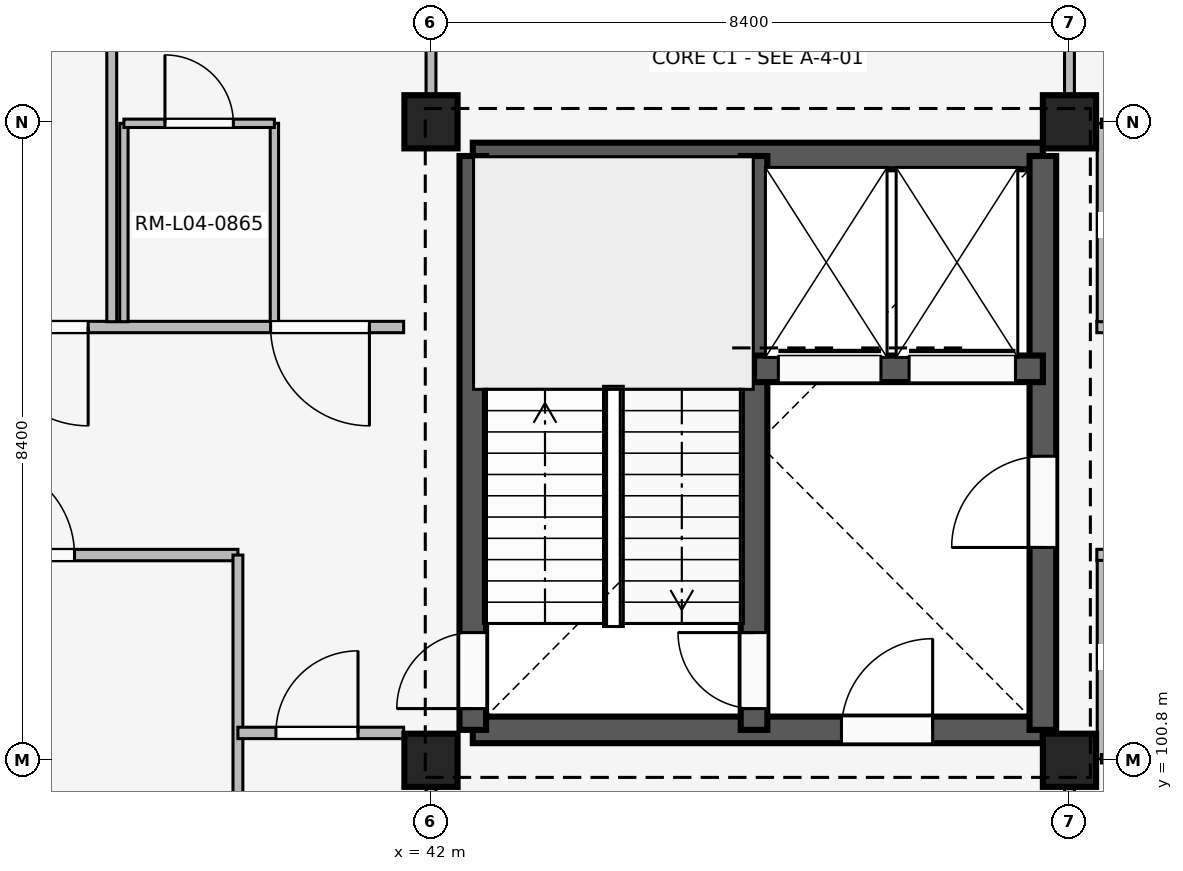
"""IFC4 building model, lengths in metres.
Left out: names, types, materials, properties, quantities, classifications, styles, units other than length and angle.
Written with IfcOpenShell. Run it as: python <this file> out.ifc"""

import sys

from ifc_helpers import new_model, si_unit, direction, frame, frame_2d, origin, origin_2d, place, context, subcontext, project, spatial, rectangle, extrude, element, fill, save


model = new_model("IFC4")
c1 = context("Model", 3, precision=1e-05, world=origin(), true_north=direction((0.0, 1.0)))
c2 = subcontext(c1, "Body", "Model", "MODEL_VIEW")
j1 = project(units=[si_unit("LENGTHUNIT", "METRE"), si_unit("PLANEANGLEUNIT", "RADIAN")], contexts=[c1])
p1 = place(None, origin())
s1 = spatial("IfcSite", under=j1, at=p1, CompositionType="ELEMENT")
p2 = place(p1, origin())
s2 = spatial("IfcBuilding", under=s1, at=p2, CompositionType="ELEMENT")
p3 = place(p2, frame((0.0, 0.0, 16.2)))
s3 = spatial("IfcBuildingStorey", under=s2, at=p3, CompositionType="ELEMENT", Elevation=16.2)
for number, where, z_axis, x_axis in (
    (1, (42.0, 100.8, 0.0), (0.0, 0.0, 1.0), (1.0, 0.0, 0.0)),
    (2, (42.0, 109.2, 0.0), (0.0, 0.0, 1.0), (1.0, 0.0, 0.0)),
    (3, (50.4, 100.8, 0.0), (0.0, 0.0, 1.0), (1.0, 0.0, 0.0)),
    (4, (50.4, 109.2, 0.0), (0.0, 0.0, 1.0), (1.0, 0.0, 0.0)),
):
    element("IfcColumn", number, at=place(p3, frame(where, z_axis=z_axis, x_axis=x_axis)), inside=s3, PredefinedType="COLUMN", context=c2, shape_type="SweptSolid", body=[
        extrude(rectangle(XDim=0.7, YDim=0.7, at=origin_2d()), origin(), (0.0, 0.0, 1.0), 4.2),
    ])
p4 = place(p3, frame((42.55, 101.2, 0.0), z_axis=(0.0, 0.0, 1.0), x_axis=(1.0, 0.0, 0.0)))
e5 = element("IfcWall", 5, at=p4, inside=s3, PredefinedType="SHEAR", context=c2, shape_type="SweptSolid", body=[
    extrude(rectangle(XDim=7.5, YDim=0.35, at=frame_2d((3.75, 0.0))), origin(), (0.0, 0.0, 1.0), 3.92),
])
p5 = place(p4, frame((4.85, 0.0, 0.0)))
e6 = element("IfcOpeningElement", 6, at=p5, cuts=e5, PredefinedType="OPENING", context=c2, shape_type="SweptSolid", body=[
    extrude(rectangle(XDim=1.2, YDim=2.2, at=frame_2d((0.6, 1.1))), frame((0.0, 0.185, 0.0), z_axis=(0.0, -1.0, 0.0), x_axis=(1.0, 0.0, 0.0)), (0.0, 0.0, 1.0), 0.37),
])
p6 = place(p3, frame((42.55, 108.75, 0.0), z_axis=(0.0, 0.0, 1.0), x_axis=(1.0, 0.0, 0.0)))
e7 = element("IfcWall", 7, at=p6, inside=s3, PredefinedType="SHEAR", context=c2, shape_type="SweptSolid", body=[
    extrude(rectangle(XDim=7.5, YDim=0.35, at=frame_2d((3.75, 0.0))), origin(), (0.0, 0.0, 1.0), 3.92),
])
p7 = place(p3, frame((42.55, 101.2, 0.0), z_axis=(0.0, 0.0, 1.0), x_axis=(0.0, 1.0, 0.0)))
e8 = element("IfcWall", 8, at=p7, inside=s3, PredefinedType="SHEAR", context=c2, shape_type="SweptSolid", body=[
    extrude(rectangle(XDim=7.55, YDim=0.35, at=frame_2d((3.775, 0.0))), origin(), (0.0, 0.0, 1.0), 3.92),
])
p8 = place(p7, frame((0.28, 0.0, 0.0)))
e9 = element("IfcOpeningElement", 9, at=p8, cuts=e8, PredefinedType="OPENING", context=c2, shape_type="SweptSolid", body=[
    extrude(rectangle(XDim=1.0, YDim=2.15, at=frame_2d((0.5, 1.075))), frame((0.0, 0.185, 0.0), z_axis=(0.0, -1.0, 0.0), x_axis=(1.0, 0.0, 0.0)), (0.0, 0.0, 1.0), 0.37),
])
p9 = place(p3, frame((50.05, 101.2, 0.0), z_axis=(0.0, 0.0, 1.0), x_axis=(0.0, 1.0, 0.0)))
e10 = element("IfcWall", 10, at=p9, inside=s3, PredefinedType="SHEAR", context=c2, shape_type="SweptSolid", body=[
    extrude(rectangle(XDim=7.55, YDim=0.35, at=frame_2d((3.775, 0.0))), origin(), (0.0, 0.0, 1.0), 3.92),
])
p10 = place(p9, frame((2.4, 0.0, 0.0)))
e11 = element("IfcOpeningElement", 11, at=p10, cuts=e10, PredefinedType="OPENING", context=c2, shape_type="SweptSolid", body=[
    extrude(rectangle(XDim=1.2, YDim=2.2, at=frame_2d((0.6, 1.1))), frame((0.0, 0.185, 0.0), z_axis=(0.0, -1.0, 0.0), x_axis=(1.0, 0.0, 0.0)), (0.0, 0.0, 1.0), 0.37),
])
p11 = place(p3, frame((46.25, 101.2, 0.0), z_axis=(0.0, 0.0, 1.0), x_axis=(0.0, 1.0, 0.0)))
e12 = element("IfcWall", 12, at=p11, inside=s3, PredefinedType="SHEAR", context=c2, shape_type="SweptSolid", body=[
    extrude(rectangle(XDim=7.55, YDim=0.35, at=frame_2d((3.775, 0.0))), origin(), (0.0, 0.0, 1.0), 3.92),
])
p12 = place(p11, frame((0.28, 0.0, 0.0)))
e13 = element("IfcOpeningElement", 13, at=p12, cuts=e12, PredefinedType="OPENING", context=c2, shape_type="SweptSolid", body=[
    extrude(rectangle(XDim=1.0, YDim=2.15, at=frame_2d((0.5, 1.075))), frame((0.0, 0.185, 0.0), z_axis=(0.0, -1.0, 0.0), x_axis=(1.0, 0.0, 0.0)), (0.0, 0.0, 1.0), 0.37),
])
p13 = place(p3, frame((46.25, 105.95, 0.0), z_axis=(0.0, 0.0, 1.0), x_axis=(1.0, 0.0, 0.0)))
e14 = element("IfcWall", 14, at=p13, inside=s3, PredefinedType="SHEAR", context=c2, shape_type="SweptSolid", body=[
    extrude(rectangle(XDim=3.8, YDim=0.35, at=frame_2d((1.9, 0.0))), origin(), (0.0, 0.0, 1.0), 3.92),
])
p14 = place(p13, frame((0.32, 0.0, 0.0)))
e15 = element("IfcOpeningElement", 15, at=p14, cuts=e14, PredefinedType="OPENING", context=c2, shape_type="SweptSolid", body=[
    extrude(rectangle(XDim=1.35, YDim=2.25, at=frame_2d((0.675, 1.125))), frame((0.0, 0.185, 0.0), z_axis=(0.0, -1.0, 0.0), x_axis=(1.0, 0.0, 0.0)), (0.0, 0.0, 1.0), 0.37),
])
p15 = place(p13, frame((2.04, 0.0, 0.0)))
e16 = element("IfcOpeningElement", 16, at=p15, cuts=e14, PredefinedType="OPENING", context=c2, shape_type="SweptSolid", body=[
    extrude(rectangle(XDim=1.4, YDim=2.25, at=frame_2d((0.7, 1.125))), frame((0.0, 0.185, 0.0), z_axis=(0.0, -1.0, 0.0), x_axis=(1.0, 0.0, 0.0)), (0.0, 0.0, 1.0), 0.37),
])
p16 = place(p3, frame((33.68, 103.5, 0.0), z_axis=(0.0, 0.0, 1.0), x_axis=(1.0, 0.0, 0.0)))
e17 = element("IfcWall", 17, at=p16, inside=s3, PredefinedType="PARTITIONING", context=c2, shape_type="SweptSolid", body=[
    extrude(rectangle(XDim=5.78, YDim=0.15, at=frame_2d((2.89, 0.0))), origin(), (0.0, 0.0, 1.0), 3.3),
])
p17 = place(p16, frame((2.38, 0.0, 0.0)))
e18 = element("IfcOpeningElement", 18, at=p17, cuts=e17, PredefinedType="OPENING", context=c2, shape_type="SweptSolid", body=[
    extrude(rectangle(XDim=1.25, YDim=2.2, at=frame_2d((0.625, 1.1))), frame((0.0, 0.085, 0.0), z_axis=(0.0, -1.0, 0.0), x_axis=(1.0, 0.0, 0.0)), (0.0, 0.0, 1.0), 0.17),
])
p18 = place(p3, frame((39.46, 92.56, 0.0), z_axis=(0.0, 0.0, 1.0), x_axis=(0.0, 1.0, 0.0)))
e19 = element("IfcWall", 19, at=p18, inside=s3, PredefinedType="PARTITIONING", context=c2, shape_type="SweptSolid", body=[
    extrude(rectangle(XDim=10.94, YDim=0.13, at=frame_2d((5.47, 0.0))), origin(), (0.0, 0.0, 1.0), 3.3),
])
p19 = place(p3, frame((39.46, 101.16, 0.0), z_axis=(0.0, 0.0, 1.0), x_axis=(1.0, 0.0, 0.0)))
e20 = element("IfcWall", 20, at=p19, inside=s3, PredefinedType="PARTITIONING", context=c2, shape_type="SweptSolid", body=[
    extrude(rectangle(XDim=2.18, YDim=0.15, at=frame_2d((1.09, 0.0))), origin(), (0.0, 0.0, 1.0), 3.3),
])
p20 = place(p19, frame((0.5, 0.0, 0.0)))
e21 = element("IfcOpeningElement", 21, at=p20, cuts=e20, PredefinedType="OPENING", context=c2, shape_type="SweptSolid", body=[
    extrude(rectangle(XDim=1.08, YDim=2.15, at=frame_2d((0.54, 1.075))), frame((0.0, 0.085, 0.0), z_axis=(0.0, -1.0, 0.0), x_axis=(1.0, 0.0, 0.0)), (0.0, 0.0, 1.0), 0.17),
])
p21 = place(p3, frame((41.64, 106.5, 0.0), z_axis=(0.0, 0.0, 1.0), x_axis=(-1.0, 0.0, 0.0)))
e22 = element("IfcWall", 22, at=p21, inside=s3, PredefinedType="PARTITIONING", context=c2, shape_type="SweptSolid", body=[
    extrude(rectangle(XDim=7.96, YDim=0.15, at=frame_2d((3.98, 0.0))), origin(), (0.0, 0.0, 1.0), 3.3),
])
p22 = place(p21, frame((0.45, 0.0, 0.0)))
e23 = element("IfcOpeningElement", 23, at=p22, cuts=e22, PredefinedType="OPENING", context=c2, shape_type="SweptSolid", body=[
    extrude(rectangle(XDim=1.3, YDim=2.25, at=frame_2d((0.65, 1.125))), frame((0.0, 0.085, 0.0), z_axis=(0.0, -1.0, 0.0), x_axis=(1.0, 0.0, 0.0)), (0.0, 0.0, 1.0), 0.17),
])
p23 = place(p21, frame((4.15, 0.0, 0.0)))
e24 = element("IfcOpeningElement", 24, at=p23, cuts=e22, PredefinedType="OPENING", context=c2, shape_type="SweptSolid", body=[
    extrude(rectangle(XDim=1.3, YDim=2.25, at=frame_2d((0.65, 1.125))), frame((0.0, 0.085, 0.0), z_axis=(0.0, -1.0, 0.0), x_axis=(1.0, 0.0, 0.0)), (0.0, 0.0, 1.0), 0.17),
])
p24 = place(p3, frame((37.8, 106.57, 0.0), z_axis=(0.0, 0.0, 1.0), x_axis=(0.0, 1.0, 0.0)))
e25 = element("IfcWall", 25, at=p24, inside=s3, PredefinedType="PARTITIONING", context=c2, shape_type="SweptSolid", body=[
    extrude(rectangle(XDim=10.93, YDim=0.13, at=frame_2d((5.465, 0.0))), origin(), (0.0, 0.0, 1.0), 3.3),
])
for number, where, z_axis, x_axis in (
    (26, (37.96, 106.57, 0.0), (0.0, 0.0, 1.0), (0.0, 1.0, 0.0)),
    (27, (39.94, 106.57, 0.0), (0.0, 0.0, 1.0), (0.0, 1.0, 0.0)),
):
    element("IfcWall", number, at=place(p3, frame(where, z_axis=z_axis, x_axis=x_axis)), inside=s3, PredefinedType="PARTITIONING", context=c2, shape_type="SweptSolid", body=[
        extrude(rectangle(XDim=2.61, YDim=0.11, at=frame_2d((1.305, 0.0))), origin(), (0.0, 0.0, 1.0), 3.3),
    ])
p25 = place(p3, frame((37.96, 109.18, 0.0), z_axis=(0.0, 0.0, 1.0), x_axis=(1.0, 0.0, 0.0)))
e28 = element("IfcWall", 28, at=p25, inside=s3, PredefinedType="PARTITIONING", context=c2, shape_type="SweptSolid", body=[
    extrude(rectangle(XDim=1.98, YDim=0.11, at=frame_2d((0.99, 0.0))), origin(), (0.0, 0.0, 1.0), 3.3),
])
p26 = place(p25, frame((0.54, 0.0, 0.0)))
e29 = element("IfcOpeningElement", 29, at=p26, cuts=e28, PredefinedType="OPENING", context=c2, shape_type="SweptSolid", body=[
    extrude(rectangle(XDim=0.9, YDim=2.1, at=frame_2d((0.45, 1.05))), frame((0.0, 0.065, 0.0), z_axis=(0.0, -1.0, 0.0), x_axis=(1.0, 0.0, 0.0)), (0.0, 0.0, 1.0), 0.13),
])
p27 = place(p3, frame((42.0, 92.54, 0.0), z_axis=(0.0, 0.0, 1.0), x_axis=(0.0, 1.0, 0.0)))
e30 = element("IfcWall", 30, at=p27, inside=s3, PredefinedType="PARTITIONING", context=c2, shape_type="SweptSolid", body=[
    extrude(rectangle(XDim=8.21, YDim=0.13, at=frame_2d((4.105, 0.0))), origin(), (0.0, 0.0, 1.0), 3.3),
])
p28 = place(p27, frame((3.64, 0.0, 0.0)))
e31 = element("IfcOpeningElement", 31, at=p28, cuts=e30, PredefinedType="OPENING", context=c2, shape_type="SweptSolid", body=[
    extrude(rectangle(XDim=1.08, YDim=2.15, at=frame_2d((0.54, 1.075))), frame((0.0, 0.075, 0.0), z_axis=(0.0, -1.0, 0.0), x_axis=(1.0, 0.0, 0.0)), (0.0, 0.0, 1.0), 0.15),
])
p29 = place(p3, frame((42.0, 109.55, 0.0), z_axis=(0.0, 0.0, 1.0), x_axis=(0.0, 1.0, 0.0)))
e32 = element("IfcWall", 32, at=p29, inside=s3, PredefinedType="PARTITIONING", context=c2, shape_type="SweptSolid", body=[
    extrude(rectangle(XDim=7.91, YDim=0.13, at=frame_2d((3.955, 0.0))), origin(), (0.0, 0.0, 1.0), 3.3),
])
p30 = place(p29, frame((3.4, 0.0, 0.0)))
e33 = element("IfcOpeningElement", 33, at=p30, cuts=e32, PredefinedType="OPENING", context=c2, shape_type="SweptSolid", body=[
    extrude(rectangle(XDim=1.05, YDim=2.2, at=frame_2d((0.525, 1.1))), frame((0.0, 0.075, 0.0), z_axis=(0.0, -1.0, 0.0), x_axis=(1.0, 0.0, 0.0)), (0.0, 0.0, 1.0), 0.15),
])
p31 = place(p3, frame((50.4, 92.54, 0.0), z_axis=(0.0, 0.0, 1.0), x_axis=(0.0, 1.0, 0.0)))
e34 = element("IfcWall", 34, at=p31, inside=s3, PredefinedType="PARTITIONING", context=c2, shape_type="SweptSolid", body=[
    extrude(rectangle(XDim=8.21, YDim=0.13, at=frame_2d((4.105, 0.0))), origin(), (0.0, 0.0, 1.0), 3.3),
])
p32 = place(p31, frame((3.64, 0.0, 0.0)))
e35 = element("IfcOpeningElement", 35, at=p32, cuts=e34, PredefinedType="OPENING", context=c2, shape_type="SweptSolid", body=[
    extrude(rectangle(XDim=1.08, YDim=2.15, at=frame_2d((0.54, 1.075))), frame((0.0, 0.075, 0.0), z_axis=(0.0, -1.0, 0.0), x_axis=(1.0, 0.0, 0.0)), (0.0, 0.0, 1.0), 0.15),
])
p33 = place(p3, frame((50.4, 109.55, 0.0), z_axis=(0.0, 0.0, 1.0), x_axis=(0.0, 1.0, 0.0)))
e36 = element("IfcWall", 36, at=p33, inside=s3, PredefinedType="PARTITIONING", context=c2, shape_type="SweptSolid", body=[
    extrude(rectangle(XDim=7.91, YDim=0.13, at=frame_2d((3.955, 0.0))), origin(), (0.0, 0.0, 1.0), 3.3),
])
p34 = place(p33, frame((3.4, 0.0, 0.0)))
e37 = element("IfcOpeningElement", 37, at=p34, cuts=e36, PredefinedType="OPENING", context=c2, shape_type="SweptSolid", body=[
    extrude(rectangle(XDim=1.05, YDim=2.2, at=frame_2d((0.525, 1.1))), frame((0.0, 0.075, 0.0), z_axis=(0.0, -1.0, 0.0), x_axis=(1.0, 0.0, 0.0)), (0.0, 0.0, 1.0), 0.15),
])
p35 = place(p3, frame((50.76, 103.5, 0.0), z_axis=(0.0, 0.0, 1.0), x_axis=(1.0, 0.0, 0.0)))
e38 = element("IfcWall", 38, at=p35, inside=s3, PredefinedType="PARTITIONING", context=c2, shape_type="SweptSolid", body=[
    extrude(rectangle(XDim=7.96, YDim=0.15, at=frame_2d((3.98, 0.0))), origin(), (0.0, 0.0, 1.0), 3.3),
])
p36 = place(p35, frame((2.25, 0.0, 0.0)))
e39 = element("IfcOpeningElement", 39, at=p36, cuts=e38, PredefinedType="OPENING", context=c2, shape_type="SweptSolid", body=[
    extrude(rectangle(XDim=1.3, YDim=2.25, at=frame_2d((0.65, 1.125))), frame((0.0, 0.085, 0.0), z_axis=(0.0, -1.0, 0.0), x_axis=(1.0, 0.0, 0.0)), (0.0, 0.0, 1.0), 0.17),
])
p37 = place(p35, frame((5.95, 0.0, 0.0)))
e40 = element("IfcOpeningElement", 40, at=p37, cuts=e38, PredefinedType="OPENING", context=c2, shape_type="SweptSolid", body=[
    extrude(rectangle(XDim=1.3, YDim=2.25, at=frame_2d((0.65, 1.125))), frame((0.0, 0.085, 0.0), z_axis=(0.0, -1.0, 0.0), x_axis=(1.0, 0.0, 0.0)), (0.0, 0.0, 1.0), 0.17),
])
p38 = place(p3, frame((50.82, 100.82, 0.0), z_axis=(0.0, 0.0, 1.0), x_axis=(0.0, 1.0, 0.0)))
e41 = element("IfcWall", 41, at=p38, inside=s3, PredefinedType="PARTITIONING", context=c2, shape_type="SweptSolid", body=[
    extrude(rectangle(XDim=2.61, YDim=0.11, at=frame_2d((1.305, 0.0))), origin(), (0.0, 0.0, 1.0), 3.3),
])
p39 = place(p3, frame((50.82, 100.82, 0.0), z_axis=(0.0, 0.0, 1.0), x_axis=(1.0, 0.0, 0.0)))
e42 = element("IfcWall", 42, at=p39, inside=s3, PredefinedType="PARTITIONING", context=c2, shape_type="SweptSolid", body=[
    extrude(rectangle(XDim=1.98, YDim=0.11, at=frame_2d((0.99, 0.0))), origin(), (0.0, 0.0, 1.0), 3.3),
])
p40 = place(p39, frame((0.54, 0.0, 0.0)))
e43 = element("IfcOpeningElement", 43, at=p40, cuts=e42, PredefinedType="OPENING", context=c2, shape_type="SweptSolid", body=[
    extrude(rectangle(XDim=0.9, YDim=2.1, at=frame_2d((0.45, 1.05))), frame((0.0, 0.065, 0.0), z_axis=(0.0, -1.0, 0.0), x_axis=(1.0, 0.0, 0.0)), (0.0, 0.0, 1.0), 0.13),
])
p41 = place(p3, frame((58.72, 106.5, 0.0), z_axis=(0.0, 0.0, 1.0), x_axis=(-1.0, 0.0, 0.0)))
e44 = element("IfcWall", 44, at=p41, inside=s3, PredefinedType="PARTITIONING", context=c2, shape_type="SweptSolid", body=[
    extrude(rectangle(XDim=7.96, YDim=0.15, at=frame_2d((3.98, 0.0))), origin(), (0.0, 0.0, 1.0), 3.3),
])
p42 = place(p41, frame((0.73, 0.0, 0.0)))
e45 = element("IfcOpeningElement", 45, at=p42, cuts=e44, PredefinedType="OPENING", context=c2, shape_type="SweptSolid", body=[
    extrude(rectangle(XDim=1.3, YDim=2.25, at=frame_2d((0.65, 1.125))), frame((0.0, 0.085, 0.0), z_axis=(0.0, -1.0, 0.0), x_axis=(1.0, 0.0, 0.0)), (0.0, 0.0, 1.0), 0.17),
])
p43 = place(p41, frame((4.43, 0.0, 0.0)))
e46 = element("IfcOpeningElement", 46, at=p43, cuts=e44, PredefinedType="OPENING", context=c2, shape_type="SweptSolid", body=[
    extrude(rectangle(XDim=1.3, YDim=2.25, at=frame_2d((0.65, 1.125))), frame((0.0, 0.085, 0.0), z_axis=(0.0, -1.0, 0.0), x_axis=(1.0, 0.0, 0.0)), (0.0, 0.0, 1.0), 0.17),
])
p44 = place(p3, frame((50.82, 106.57, 0.0), z_axis=(0.0, 0.0, 1.0), x_axis=(0.0, 1.0, 0.0)))
e47 = element("IfcWall", 47, at=p44, inside=s3, PredefinedType="PARTITIONING", context=c2, shape_type="SweptSolid", body=[
    extrude(rectangle(XDim=2.61, YDim=0.11, at=frame_2d((1.305, 0.0))), origin(), (0.0, 0.0, 1.0), 3.3),
])
p45 = place(p3, frame((50.82, 109.18, 0.0), z_axis=(0.0, 0.0, 1.0), x_axis=(1.0, 0.0, 0.0)))
e48 = element("IfcWall", 48, at=p45, inside=s3, PredefinedType="PARTITIONING", context=c2, shape_type="SweptSolid", body=[
    extrude(rectangle(XDim=1.98, YDim=0.11, at=frame_2d((0.99, 0.0))), origin(), (0.0, 0.0, 1.0), 3.3),
])
p46 = place(p45, frame((0.54, 0.0, 0.0)))
e49 = element("IfcOpeningElement", 49, at=p46, cuts=e48, PredefinedType="OPENING", context=c2, shape_type="SweptSolid", body=[
    extrude(rectangle(XDim=0.9, YDim=2.1, at=frame_2d((0.45, 1.05))), frame((0.0, 0.065, 0.0), z_axis=(0.0, -1.0, 0.0), x_axis=(1.0, 0.0, 0.0)), (0.0, 0.0, 1.0), 0.13),
])
p47 = place(p10, origin())
e50 = element("IfcDoor", 50, at=p47, inside=s3, OperationType="SINGLE_SWING_LEFT", PredefinedType="DOOR", context=c2, shape_type="SweptSolid", body=[
    extrude(rectangle(XDim=1.2, YDim=2.2, at=frame_2d((0.6, 1.1))), frame((0.0, 0.025, 0.0), z_axis=(0.0, -1.0, 0.0), x_axis=(1.0, 0.0, 0.0)), (0.0, 0.0, 1.0), 0.05),
])
fill(e11, e50)
p48 = place(p5, origin())
e51 = element("IfcDoor", 51, at=p48, inside=s3, OperationType="SINGLE_SWING_RIGHT", PredefinedType="DOOR", context=c2, shape_type="SweptSolid", body=[
    extrude(rectangle(XDim=1.2, YDim=2.2, at=frame_2d((0.6, 1.1))), frame((0.0, 0.025, 0.0), z_axis=(0.0, -1.0, 0.0), x_axis=(1.0, 0.0, 0.0)), (0.0, 0.0, 1.0), 0.05),
])
fill(e6, e51)
p49 = place(p8, origin())
e52 = element("IfcDoor", 52, at=p49, inside=s3, OperationType="SINGLE_SWING_LEFT", PredefinedType="DOOR", context=c2, shape_type="SweptSolid", body=[
    extrude(rectangle(XDim=1.0, YDim=2.15, at=frame_2d((0.5, 1.075))), frame((0.0, 0.025, 0.0), z_axis=(0.0, -1.0, 0.0), x_axis=(1.0, 0.0, 0.0)), (0.0, 0.0, 1.0), 0.05),
])
fill(e9, e52)
p50 = place(p12, origin())
e53 = element("IfcDoor", 53, at=p50, inside=s3, OperationType="SINGLE_SWING_RIGHT", PredefinedType="DOOR", context=c2, shape_type="SweptSolid", body=[
    extrude(rectangle(XDim=1.0, YDim=2.15, at=frame_2d((0.5, 1.075))), frame((0.0, 0.025, 0.0), z_axis=(0.0, -1.0, 0.0), x_axis=(1.0, 0.0, 0.0)), (0.0, 0.0, 1.0), 0.05),
])
fill(e13, e53)
p51 = place(p14, origin())
e54 = element("IfcDoor", 54, at=p51, inside=s3, OperationType="SLIDING_TO_LEFT", PredefinedType="DOOR", context=c2, shape_type="SweptSolid", body=[
    extrude(rectangle(XDim=1.35, YDim=2.25, at=frame_2d((0.675, 1.125))), frame((0.0, 0.025, 0.0), z_axis=(0.0, -1.0, 0.0), x_axis=(1.0, 0.0, 0.0)), (0.0, 0.0, 1.0), 0.05),
])
fill(e15, e54)
p52 = place(p15, origin())
e55 = element("IfcDoor", 55, at=p52, inside=s3, OperationType="SLIDING_TO_LEFT", PredefinedType="DOOR", context=c2, shape_type="SweptSolid", body=[
    extrude(rectangle(XDim=1.4, YDim=2.25, at=frame_2d((0.7, 1.125))), frame((0.0, 0.025, 0.0), z_axis=(0.0, -1.0, 0.0), x_axis=(1.0, 0.0, 0.0)), (0.0, 0.0, 1.0), 0.05),
])
fill(e16, e55)
p53 = place(p17, origin())
e56 = element("IfcDoor", 56, at=p53, inside=s3, OperationType="SINGLE_SWING_LEFT", PredefinedType="DOOR", context=c2, shape_type="SweptSolid", body=[
    extrude(rectangle(XDim=1.25, YDim=2.2, at=frame_2d((0.625, 1.1))), frame((0.0, 0.025, 0.0), z_axis=(0.0, -1.0, 0.0), x_axis=(1.0, 0.0, 0.0)), (0.0, 0.0, 1.0), 0.05),
])
fill(e18, e56)
p54 = place(p20, origin())
e57 = element("IfcDoor", 57, at=p54, inside=s3, OperationType="SINGLE_SWING_RIGHT", PredefinedType="DOOR", context=c2, shape_type="SweptSolid", body=[
    extrude(rectangle(XDim=1.08, YDim=2.15, at=frame_2d((0.54, 1.075))), frame((0.0, 0.025, 0.0), z_axis=(0.0, -1.0, 0.0), x_axis=(1.0, 0.0, 0.0)), (0.0, 0.0, 1.0), 0.05),
])
fill(e21, e57)
p55 = place(p22, origin())
e58 = element("IfcDoor", 58, at=p55, inside=s3, OperationType="SINGLE_SWING_LEFT", PredefinedType="DOOR", context=c2, shape_type="SweptSolid", body=[
    extrude(rectangle(XDim=1.3, YDim=2.25, at=frame_2d((0.65, 1.125))), frame((0.0, 0.025, 0.0), z_axis=(0.0, -1.0, 0.0), x_axis=(1.0, 0.0, 0.0)), (0.0, 0.0, 1.0), 0.05),
])
fill(e23, e58)
p56 = place(p23, origin())
e59 = element("IfcDoor", 59, at=p56, inside=s3, OperationType="SINGLE_SWING_LEFT", PredefinedType="DOOR", context=c2, shape_type="SweptSolid", body=[
    extrude(rectangle(XDim=1.3, YDim=2.25, at=frame_2d((0.65, 1.125))), frame((0.0, 0.025, 0.0), z_axis=(0.0, -1.0, 0.0), x_axis=(1.0, 0.0, 0.0)), (0.0, 0.0, 1.0), 0.05),
])
fill(e24, e59)
p57 = place(p26, origin())
e60 = element("IfcDoor", 60, at=p57, inside=s3, OperationType="SINGLE_SWING_LEFT", PredefinedType="DOOR", context=c2, shape_type="SweptSolid", body=[
    extrude(rectangle(XDim=0.9, YDim=2.1, at=frame_2d((0.45, 1.05))), frame((0.0, 0.025, 0.0), z_axis=(0.0, -1.0, 0.0), x_axis=(1.0, 0.0, 0.0)), (0.0, 0.0, 1.0), 0.05),
])
fill(e29, e60)
save(model, sys.argv[1])
